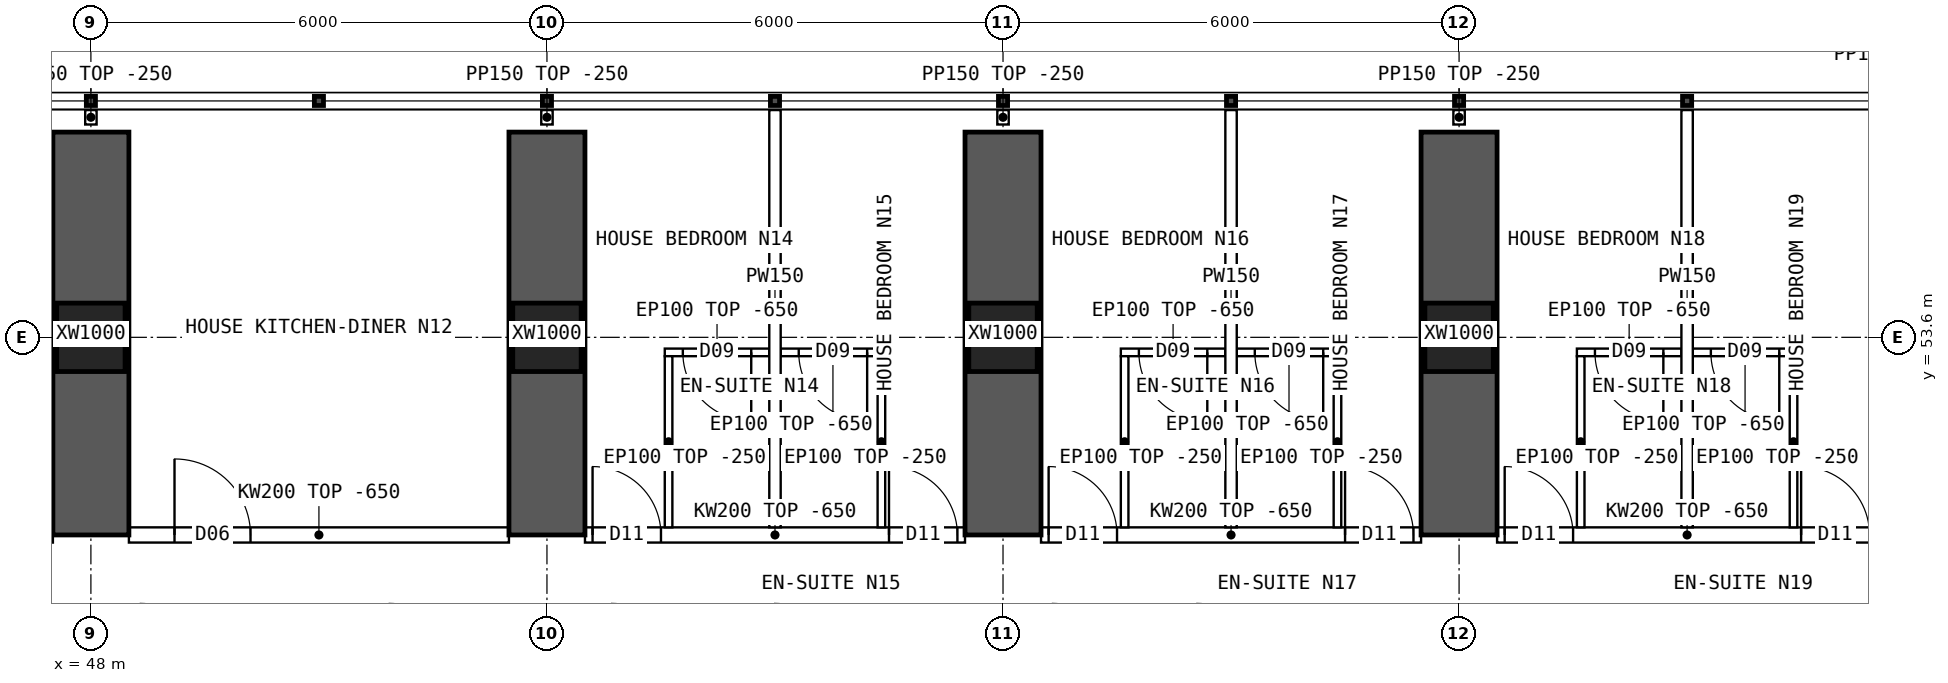
"""IFC4 building model, lengths in metres.
Left out: names, types, materials, properties, quantities, classifications, styles, units other than length and angle.
Written with IfcOpenShell. Run it as: python <this file> out.ifc"""

import sys

from ifc_helpers import new_model, si_unit, direction, frame, frame_2d, origin, origin_2d, place, context, subcontext, project, spatial, polyline, rectangle, hollow_rectangle, outline, extrude, element, fill, save


model = new_model("IFC4")
c1 = context("Model", 3, precision=1e-05, world=origin(), true_north=direction((0.0, 1.0)))
c2 = subcontext(c1, "Body", "Model", "MODEL_VIEW")
j1 = project(units=[si_unit("LENGTHUNIT", "METRE"), si_unit("PLANEANGLEUNIT", "RADIAN")], contexts=[c1])
p1 = place(None, origin())
s1 = spatial("IfcSite", under=j1, at=p1, CompositionType="ELEMENT")
p2 = place(p1, origin())
s2 = spatial("IfcBuilding", under=s1, at=p2, CompositionType="ELEMENT")
p3 = place(p2, frame((0.0, 0.0, 38.95)))
s3 = spatial("IfcBuildingStorey", under=s2, at=p3, CompositionType="ELEMENT", Elevation=38.95)
for number, where, z_axis, x_axis in (
    (1, (48.0, 53.6, 0.0), (0.0, 0.0, 1.0), (1.0, 0.0, 0.0)),
    (2, (54.0, 53.6, 0.0), (0.0, 0.0, 1.0), (1.0, 0.0, 0.0)),
    (3, (60.0, 53.6, 0.0), (0.0, 0.0, 1.0), (1.0, 0.0, 0.0)),
    (4, (66.0, 53.6, 0.0), (0.0, 0.0, 1.0), (1.0, 0.0, 0.0)),
):
    element("IfcColumn", number, at=place(p3, frame(where, z_axis=z_axis, x_axis=x_axis)), inside=s3, PredefinedType="COLUMN", context=c2, shape_type="SweptSolid", body=[
        extrude(hollow_rectangle(XDim=0.9, YDim=0.9, WallThickness=0.09, at=origin_2d()), origin(), (0.0, 0.0, 1.0), 3.75),
    ])
for number, where, z_axis, x_axis in (
    (5, (48.0, 51.0, 0.0), (0.0, 0.0, 1.0), (0.0, 1.0, 0.0)),
    (6, (54.0, 51.0, 0.0), (0.0, 0.0, 1.0), (0.0, 1.0, 0.0)),
    (7, (60.0, 51.0, 0.0), (0.0, 0.0, 1.0), (0.0, 1.0, 0.0)),
    (8, (66.0, 51.0, 0.0), (0.0, 0.0, 1.0), (0.0, 1.0, 0.0)),
):
    element("IfcWall", number, at=place(p3, frame(where, z_axis=z_axis, x_axis=x_axis)), inside=s3, PredefinedType="SHEAR", context=c2, shape_type="SweptSolid", body=[
        extrude(rectangle(XDim=5.3, YDim=1.0, at=frame_2d((2.65, 0.0))), origin(), (0.0, 0.0, 1.0), 3.75),
    ])
p4 = place(p3, frame((48.5, 51.0, 0.0), z_axis=(0.0, 0.0, 1.0), x_axis=(1.0, 0.0, 0.0)))
e9 = element("IfcWall", 9, at=p4, inside=s3, PredefinedType="SOLIDWALL", context=c2, shape_type="SweptSolid", body=[
    extrude(outline(polyline([(0.0, 0.0), (5.0, 0.0), (5.0, 3.1), (0.0, 3.1), (0.0, 0.0)])), frame((0.0, 0.1, 0.0), z_axis=(0.0, -1.0, 0.0), x_axis=(1.0, 0.0, 0.0)), (0.0, 0.0, 1.0), 0.2),
])
p5 = place(p4, frame((0.6, 0.0, 0.0)))
e10 = element("IfcOpeningElement", 10, at=p5, cuts=e9, PredefinedType="OPENING", context=c2, shape_type="SweptSolid", body=[
    extrude(rectangle(XDim=1.0, YDim=2.1, at=frame_2d((0.5, 1.05))), frame((0.0, 0.11, 0.0), z_axis=(0.0, -1.0, 0.0), x_axis=(1.0, 0.0, 0.0)), (0.0, 0.0, 1.0), 0.22),
])
p6 = place(p3, frame((54.5, 51.0, 0.0), z_axis=(0.0, 0.0, 1.0), x_axis=(1.0, 0.0, 0.0)))
e11 = element("IfcWall", 11, at=p6, inside=s3, PredefinedType="SOLIDWALL", context=c2, shape_type="SweptSolid", body=[
    extrude(outline(polyline([(0.0, 0.0), (5.0, 0.0), (5.0, 3.1), (0.0, 3.1), (0.0, 0.0)])), frame((0.0, 0.1, 0.0), z_axis=(0.0, -1.0, 0.0), x_axis=(1.0, 0.0, 0.0)), (0.0, 0.0, 1.0), 0.2),
])
p7 = place(p6, frame((0.1, 0.0, 0.0)))
e12 = element("IfcOpeningElement", 12, at=p7, cuts=e11, PredefinedType="OPENING", context=c2, shape_type="SweptSolid", body=[
    extrude(rectangle(XDim=0.9, YDim=2.1, at=frame_2d((0.45, 1.05))), frame((0.0, 0.11, 0.0), z_axis=(0.0, -1.0, 0.0), x_axis=(1.0, 0.0, 0.0)), (0.0, 0.0, 1.0), 0.22),
])
p8 = place(p6, frame((4.0, 0.0, 0.0)))
e13 = element("IfcOpeningElement", 13, at=p8, cuts=e11, PredefinedType="OPENING", context=c2, shape_type="SweptSolid", body=[
    extrude(rectangle(XDim=0.9, YDim=2.1, at=frame_2d((0.45, 1.05))), frame((0.0, 0.11, 0.0), z_axis=(0.0, -1.0, 0.0), x_axis=(1.0, 0.0, 0.0)), (0.0, 0.0, 1.0), 0.22),
])
p9 = place(p3, frame((60.5, 51.0, 0.0), z_axis=(0.0, 0.0, 1.0), x_axis=(1.0, 0.0, 0.0)))
e14 = element("IfcWall", 14, at=p9, inside=s3, PredefinedType="SOLIDWALL", context=c2, shape_type="SweptSolid", body=[
    extrude(outline(polyline([(0.0, 0.0), (5.0, 0.0), (5.0, 3.1), (0.0, 3.1), (0.0, 0.0)])), frame((0.0, 0.1, 0.0), z_axis=(0.0, -1.0, 0.0), x_axis=(1.0, 0.0, 0.0)), (0.0, 0.0, 1.0), 0.2),
])
p10 = place(p9, frame((0.1, 0.0, 0.0)))
e15 = element("IfcOpeningElement", 15, at=p10, cuts=e14, PredefinedType="OPENING", context=c2, shape_type="SweptSolid", body=[
    extrude(rectangle(XDim=0.9, YDim=2.1, at=frame_2d((0.45, 1.05))), frame((0.0, 0.11, 0.0), z_axis=(0.0, -1.0, 0.0), x_axis=(1.0, 0.0, 0.0)), (0.0, 0.0, 1.0), 0.22),
])
p11 = place(p9, frame((4.0, 0.0, 0.0)))
e16 = element("IfcOpeningElement", 16, at=p11, cuts=e14, PredefinedType="OPENING", context=c2, shape_type="SweptSolid", body=[
    extrude(rectangle(XDim=0.9, YDim=2.1, at=frame_2d((0.45, 1.05))), frame((0.0, 0.11, 0.0), z_axis=(0.0, -1.0, 0.0), x_axis=(1.0, 0.0, 0.0)), (0.0, 0.0, 1.0), 0.22),
])
p12 = place(p3, frame((66.5, 51.0, 0.0), z_axis=(0.0, 0.0, 1.0), x_axis=(1.0, 0.0, 0.0)))
e17 = element("IfcWall", 17, at=p12, inside=s3, PredefinedType="SOLIDWALL", context=c2, shape_type="SweptSolid", body=[
    extrude(outline(polyline([(0.0, 0.0), (5.0, 0.0), (5.0, 3.1), (0.0, 3.1), (0.0, 0.0)])), frame((0.0, 0.1, 0.0), z_axis=(0.0, -1.0, 0.0), x_axis=(1.0, 0.0, 0.0)), (0.0, 0.0, 1.0), 0.2),
])
p13 = place(p12, frame((0.1, 0.0, 0.0)))
e18 = element("IfcOpeningElement", 18, at=p13, cuts=e17, PredefinedType="OPENING", context=c2, shape_type="SweptSolid", body=[
    extrude(rectangle(XDim=0.9, YDim=2.1, at=frame_2d((0.45, 1.05))), frame((0.0, 0.11, 0.0), z_axis=(0.0, -1.0, 0.0), x_axis=(1.0, 0.0, 0.0)), (0.0, 0.0, 1.0), 0.22),
])
p14 = place(p12, frame((4.0, 0.0, 0.0)))
e19 = element("IfcOpeningElement", 19, at=p14, cuts=e17, PredefinedType="OPENING", context=c2, shape_type="SweptSolid", body=[
    extrude(rectangle(XDim=0.9, YDim=2.1, at=frame_2d((0.45, 1.05))), frame((0.0, 0.11, 0.0), z_axis=(0.0, -1.0, 0.0), x_axis=(1.0, 0.0, 0.0)), (0.0, 0.0, 1.0), 0.22),
])
p15 = place(p3, frame((57.0, 56.59, 0.0), z_axis=(0.0, 0.0, 1.0), x_axis=(0.0, -1.0, 0.0)))
e20 = element("IfcWall", 20, at=p15, inside=s3, PredefinedType="PARTITIONING", context=c2, shape_type="SweptSolid", body=[
    extrude(outline(polyline([(0.0, 0.0), (5.49, 0.0), (5.49, 3.1), (5.442, 3.1), (5.44, 3.5), (3.192, 3.5), (3.19, 3.1), (2.792, 3.1), (2.79, 3.5), (0.0, 3.5), (0.0, 0.0)])), frame((0.0, 0.075, 0.0), z_axis=(0.0, -1.0, 0.0), x_axis=(1.0, 0.0, 0.0)), (0.0, 0.0, 1.0), 0.15),
])
p16 = place(p3, frame((55.55, 53.402, 0.0), z_axis=(0.0, 0.0, 1.0), x_axis=(1.0, 0.0, 0.0)))
e21 = element("IfcWall", 21, at=p16, inside=s3, PredefinedType="PARTITIONING", context=c2, shape_type="SweptSolid", body=[
    extrude(outline(polyline([(0.0, 0.0), (1.375, 0.0), (1.375, 3.1), (0.0, 3.1), (0.0, 0.0)])), frame((0.0, 0.05, 0.0), z_axis=(0.0, -1.0, 0.0), x_axis=(1.0, 0.0, 0.0)), (0.0, 0.0, 1.0), 0.1),
])
p17 = place(p16, frame((0.238, 0.0, 0.0)))
e22 = element("IfcOpeningElement", 22, at=p17, cuts=e21, PredefinedType="OPENING", context=c2, shape_type="SweptSolid", body=[
    extrude(rectangle(XDim=0.9, YDim=2.1, at=frame_2d((0.45, 1.05))), frame((0.0, 0.06, 0.0), z_axis=(0.0, -1.0, 0.0), x_axis=(1.0, 0.0, 0.0)), (0.0, 0.0, 1.0), 0.12),
])
p18 = place(p3, frame((55.6, 53.352, 0.0), z_axis=(0.0, 0.0, 1.0), x_axis=(0.0, -1.0, 0.0)))
e23 = element("IfcWall", 23, at=p18, inside=s3, PredefinedType="PARTITIONING", context=c2, shape_type="SweptSolid", body=[
    extrude(outline(polyline([(0.0, 0.0), (2.252, 0.0), (2.252, 3.1), (2.204, 3.1), (2.202, 3.5), (0.0, 3.5), (0.0, 0.0)])), frame((0.0, 0.05, 0.0), z_axis=(0.0, -1.0, 0.0), x_axis=(1.0, 0.0, 0.0)), (0.0, 0.0, 1.0), 0.1),
])
p19 = place(p3, frame((57.075, 53.402, 0.0), z_axis=(0.0, 0.0, 1.0), x_axis=(1.0, 0.0, 0.0)))
e24 = element("IfcWall", 24, at=p19, inside=s3, PredefinedType="PARTITIONING", context=c2, shape_type="SweptSolid", body=[
    extrude(outline(polyline([(0.0, 0.0), (1.375, 0.0), (1.375, 3.1), (0.0, 3.1), (0.0, 0.0)])), frame((0.0, 0.05, 0.0), z_axis=(0.0, -1.0, 0.0), x_axis=(1.0, 0.0, 0.0)), (0.0, 0.0, 1.0), 0.1),
])
p20 = place(p19, frame((0.238, 0.0, 0.0)))
e25 = element("IfcOpeningElement", 25, at=p20, cuts=e24, PredefinedType="OPENING", context=c2, shape_type="SweptSolid", body=[
    extrude(rectangle(XDim=0.9, YDim=2.1, at=frame_2d((0.45, 1.05))), frame((0.0, 0.06, 0.0), z_axis=(0.0, -1.0, 0.0), x_axis=(1.0, 0.0, 0.0)), (0.0, 0.0, 1.0), 0.12),
])
p21 = place(p3, frame((58.4, 53.352, 0.0), z_axis=(0.0, 0.0, 1.0), x_axis=(0.0, -1.0, 0.0)))
e26 = element("IfcWall", 26, at=p21, inside=s3, PredefinedType="PARTITIONING", context=c2, shape_type="SweptSolid", body=[
    extrude(outline(polyline([(0.0, 0.0), (2.252, 0.0), (2.252, 3.1), (2.204, 3.1), (2.202, 3.5), (0.0, 3.5), (0.0, 0.0)])), frame((0.0, 0.05, 0.0), z_axis=(0.0, -1.0, 0.0), x_axis=(1.0, 0.0, 0.0)), (0.0, 0.0, 1.0), 0.1),
])
p22 = place(p3, frame((63.0, 56.59, 0.0), z_axis=(0.0, 0.0, 1.0), x_axis=(0.0, -1.0, 0.0)))
e27 = element("IfcWall", 27, at=p22, inside=s3, PredefinedType="PARTITIONING", context=c2, shape_type="SweptSolid", body=[
    extrude(outline(polyline([(0.0, 0.0), (5.49, 0.0), (5.49, 3.1), (5.442, 3.1), (5.44, 3.5), (3.192, 3.5), (3.19, 3.1), (2.792, 3.1), (2.79, 3.5), (0.0, 3.5), (0.0, 0.0)])), frame((0.0, 0.075, 0.0), z_axis=(0.0, -1.0, 0.0), x_axis=(1.0, 0.0, 0.0)), (0.0, 0.0, 1.0), 0.15),
])
p23 = place(p3, frame((61.55, 53.402, 0.0), z_axis=(0.0, 0.0, 1.0), x_axis=(1.0, 0.0, 0.0)))
e28 = element("IfcWall", 28, at=p23, inside=s3, PredefinedType="PARTITIONING", context=c2, shape_type="SweptSolid", body=[
    extrude(outline(polyline([(0.0, 0.0), (1.375, 0.0), (1.375, 3.1), (0.0, 3.1), (0.0, 0.0)])), frame((0.0, 0.05, 0.0), z_axis=(0.0, -1.0, 0.0), x_axis=(1.0, 0.0, 0.0)), (0.0, 0.0, 1.0), 0.1),
])
p24 = place(p23, frame((0.238, 0.0, 0.0)))
e29 = element("IfcOpeningElement", 29, at=p24, cuts=e28, PredefinedType="OPENING", context=c2, shape_type="SweptSolid", body=[
    extrude(rectangle(XDim=0.9, YDim=2.1, at=frame_2d((0.45, 1.05))), frame((0.0, 0.06, 0.0), z_axis=(0.0, -1.0, 0.0), x_axis=(1.0, 0.0, 0.0)), (0.0, 0.0, 1.0), 0.12),
])
p25 = place(p3, frame((61.6, 53.352, 0.0), z_axis=(0.0, 0.0, 1.0), x_axis=(0.0, -1.0, 0.0)))
e30 = element("IfcWall", 30, at=p25, inside=s3, PredefinedType="PARTITIONING", context=c2, shape_type="SweptSolid", body=[
    extrude(outline(polyline([(0.0, 0.0), (2.252, 0.0), (2.252, 3.1), (2.204, 3.1), (2.202, 3.5), (0.0, 3.5), (0.0, 0.0)])), frame((0.0, 0.05, 0.0), z_axis=(0.0, -1.0, 0.0), x_axis=(1.0, 0.0, 0.0)), (0.0, 0.0, 1.0), 0.1),
])
p26 = place(p3, frame((63.075, 53.402, 0.0), z_axis=(0.0, 0.0, 1.0), x_axis=(1.0, 0.0, 0.0)))
e31 = element("IfcWall", 31, at=p26, inside=s3, PredefinedType="PARTITIONING", context=c2, shape_type="SweptSolid", body=[
    extrude(outline(polyline([(0.0, 0.0), (1.375, 0.0), (1.375, 3.1), (0.0, 3.1), (0.0, 0.0)])), frame((0.0, 0.05, 0.0), z_axis=(0.0, -1.0, 0.0), x_axis=(1.0, 0.0, 0.0)), (0.0, 0.0, 1.0), 0.1),
])
p27 = place(p26, frame((0.238, 0.0, 0.0)))
e32 = element("IfcOpeningElement", 32, at=p27, cuts=e31, PredefinedType="OPENING", context=c2, shape_type="SweptSolid", body=[
    extrude(rectangle(XDim=0.9, YDim=2.1, at=frame_2d((0.45, 1.05))), frame((0.0, 0.06, 0.0), z_axis=(0.0, -1.0, 0.0), x_axis=(1.0, 0.0, 0.0)), (0.0, 0.0, 1.0), 0.12),
])
p28 = place(p3, frame((64.4, 53.352, 0.0), z_axis=(0.0, 0.0, 1.0), x_axis=(0.0, -1.0, 0.0)))
e33 = element("IfcWall", 33, at=p28, inside=s3, PredefinedType="PARTITIONING", context=c2, shape_type="SweptSolid", body=[
    extrude(outline(polyline([(0.0, 0.0), (2.252, 0.0), (2.252, 3.1), (2.204, 3.1), (2.202, 3.5), (0.0, 3.5), (0.0, 0.0)])), frame((0.0, 0.05, 0.0), z_axis=(0.0, -1.0, 0.0), x_axis=(1.0, 0.0, 0.0)), (0.0, 0.0, 1.0), 0.1),
])
p29 = place(p3, frame((69.0, 56.59, 0.0), z_axis=(0.0, 0.0, 1.0), x_axis=(0.0, -1.0, 0.0)))
e34 = element("IfcWall", 34, at=p29, inside=s3, PredefinedType="PARTITIONING", context=c2, shape_type="SweptSolid", body=[
    extrude(outline(polyline([(0.0, 0.0), (5.49, 0.0), (5.49, 3.1), (5.442, 3.1), (5.44, 3.5), (3.192, 3.5), (3.19, 3.1), (2.792, 3.1), (2.79, 3.5), (0.0, 3.5), (0.0, 0.0)])), frame((0.0, 0.075, 0.0), z_axis=(0.0, -1.0, 0.0), x_axis=(1.0, 0.0, 0.0)), (0.0, 0.0, 1.0), 0.15),
])
p30 = place(p3, frame((67.55, 53.402, 0.0), z_axis=(0.0, 0.0, 1.0), x_axis=(1.0, 0.0, 0.0)))
e35 = element("IfcWall", 35, at=p30, inside=s3, PredefinedType="PARTITIONING", context=c2, shape_type="SweptSolid", body=[
    extrude(outline(polyline([(0.0, 0.0), (1.375, 0.0), (1.375, 3.1), (0.0, 3.1), (0.0, 0.0)])), frame((0.0, 0.05, 0.0), z_axis=(0.0, -1.0, 0.0), x_axis=(1.0, 0.0, 0.0)), (0.0, 0.0, 1.0), 0.1),
])
p31 = place(p30, frame((0.238, 0.0, 0.0)))
e36 = element("IfcOpeningElement", 36, at=p31, cuts=e35, PredefinedType="OPENING", context=c2, shape_type="SweptSolid", body=[
    extrude(rectangle(XDim=0.9, YDim=2.1, at=frame_2d((0.45, 1.05))), frame((0.0, 0.06, 0.0), z_axis=(0.0, -1.0, 0.0), x_axis=(1.0, 0.0, 0.0)), (0.0, 0.0, 1.0), 0.12),
])
p32 = place(p3, frame((67.6, 53.352, 0.0), z_axis=(0.0, 0.0, 1.0), x_axis=(0.0, -1.0, 0.0)))
e37 = element("IfcWall", 37, at=p32, inside=s3, PredefinedType="PARTITIONING", context=c2, shape_type="SweptSolid", body=[
    extrude(outline(polyline([(0.0, 0.0), (2.252, 0.0), (2.252, 3.1), (2.204, 3.1), (2.202, 3.5), (0.0, 3.5), (0.0, 0.0)])), frame((0.0, 0.05, 0.0), z_axis=(0.0, -1.0, 0.0), x_axis=(1.0, 0.0, 0.0)), (0.0, 0.0, 1.0), 0.1),
])
p33 = place(p3, frame((69.075, 53.402, 0.0), z_axis=(0.0, 0.0, 1.0), x_axis=(1.0, 0.0, 0.0)))
e38 = element("IfcWall", 38, at=p33, inside=s3, PredefinedType="PARTITIONING", context=c2, shape_type="SweptSolid", body=[
    extrude(outline(polyline([(0.0, 0.0), (1.375, 0.0), (1.375, 3.1), (0.0, 3.1), (0.0, 0.0)])), frame((0.0, 0.05, 0.0), z_axis=(0.0, -1.0, 0.0), x_axis=(1.0, 0.0, 0.0)), (0.0, 0.0, 1.0), 0.1),
])
p34 = place(p33, frame((0.238, 0.0, 0.0)))
e39 = element("IfcOpeningElement", 39, at=p34, cuts=e38, PredefinedType="OPENING", context=c2, shape_type="SweptSolid", body=[
    extrude(rectangle(XDim=0.9, YDim=2.1, at=frame_2d((0.45, 1.05))), frame((0.0, 0.06, 0.0), z_axis=(0.0, -1.0, 0.0), x_axis=(1.0, 0.0, 0.0)), (0.0, 0.0, 1.0), 0.12),
])
p35 = place(p3, frame((70.4, 53.352, 0.0), z_axis=(0.0, 0.0, 1.0), x_axis=(0.0, -1.0, 0.0)))
e40 = element("IfcWall", 40, at=p35, inside=s3, PredefinedType="PARTITIONING", context=c2, shape_type="SweptSolid", body=[
    extrude(outline(polyline([(0.0, 0.0), (2.252, 0.0), (2.252, 3.1), (2.204, 3.1), (2.202, 3.5), (0.0, 3.5), (0.0, 0.0)])), frame((0.0, 0.05, 0.0), z_axis=(0.0, -1.0, 0.0), x_axis=(1.0, 0.0, 0.0)), (0.0, 0.0, 1.0), 0.1),
])
for number, where, z_axis, x_axis in (
    (41, (48.0, 56.4, 0.0), (0.0, 0.0, 1.0), (0.0, 1.0, 0.0)),
    (42, (54.0, 56.4, 0.0), (0.0, 0.0, 1.0), (0.0, 1.0, 0.0)),
    (43, (60.0, 56.4, 0.0), (0.0, 0.0, 1.0), (0.0, 1.0, 0.0)),
    (44, (66.0, 56.4, 0.0), (0.0, 0.0, 1.0), (0.0, 1.0, 0.0)),
):
    element("IfcWall", number, at=place(p3, frame(where, z_axis=z_axis, x_axis=x_axis)), inside=s3, PredefinedType="PARTITIONING", context=c2, shape_type="SweptSolid", body=[
        extrude(rectangle(XDim=0.19, YDim=0.15, at=frame_2d((0.095, 0.0))), origin(), (0.0, 0.0, 1.0), 3.5),
    ])
p36 = place(p5, origin())
e45 = element("IfcDoor", 45, at=p36, inside=s3, OperationType="SINGLE_SWING_LEFT", PredefinedType="DOOR", context=c2, shape_type="SweptSolid", body=[
    extrude(rectangle(XDim=1.0, YDim=2.1, at=frame_2d((0.5, 1.05))), frame((0.0, 0.025, 0.0), z_axis=(0.0, -1.0, 0.0), x_axis=(1.0, 0.0, 0.0)), (0.0, 0.0, 1.0), 0.05),
])
fill(e10, e45)
p37 = place(p17, origin())
e46 = element("IfcDoor", 46, at=p37, inside=s3, OperationType="SINGLE_SWING_RIGHT", PredefinedType="DOOR", context=c2, shape_type="SweptSolid", body=[
    extrude(rectangle(XDim=0.9, YDim=2.1, at=frame_2d((0.45, 1.05))), frame((0.0, 0.025, 0.0), z_axis=(0.0, -1.0, 0.0), x_axis=(1.0, 0.0, 0.0)), (0.0, 0.0, 1.0), 0.05),
])
fill(e22, e46)
p38 = place(p7, origin())
e47 = element("IfcDoor", 47, at=p38, inside=s3, OperationType="SINGLE_SWING_LEFT", PredefinedType="DOOR", context=c2, shape_type="SweptSolid", body=[
    extrude(rectangle(XDim=0.9, YDim=2.1, at=frame_2d((0.45, 1.05))), frame((0.0, 0.025, 0.0), z_axis=(0.0, -1.0, 0.0), x_axis=(1.0, 0.0, 0.0)), (0.0, 0.0, 1.0), 0.05),
])
fill(e12, e47)
p39 = place(p20, origin())
e48 = element("IfcDoor", 48, at=p39, inside=s3, OperationType="SINGLE_SWING_RIGHT", PredefinedType="DOOR", context=c2, shape_type="SweptSolid", body=[
    extrude(rectangle(XDim=0.9, YDim=2.1, at=frame_2d((0.45, 1.05))), frame((0.0, 0.025, 0.0), z_axis=(0.0, -1.0, 0.0), x_axis=(1.0, 0.0, 0.0)), (0.0, 0.0, 1.0), 0.05),
])
fill(e25, e48)
p40 = place(p8, origin())
e49 = element("IfcDoor", 49, at=p40, inside=s3, OperationType="SINGLE_SWING_LEFT", PredefinedType="DOOR", context=c2, shape_type="SweptSolid", body=[
    extrude(rectangle(XDim=0.9, YDim=2.1, at=frame_2d((0.45, 1.05))), frame((0.0, 0.025, 0.0), z_axis=(0.0, -1.0, 0.0), x_axis=(1.0, 0.0, 0.0)), (0.0, 0.0, 1.0), 0.05),
])
fill(e13, e49)
p41 = place(p24, origin())
e50 = element("IfcDoor", 50, at=p41, inside=s3, OperationType="SINGLE_SWING_RIGHT", PredefinedType="DOOR", context=c2, shape_type="SweptSolid", body=[
    extrude(rectangle(XDim=0.9, YDim=2.1, at=frame_2d((0.45, 1.05))), frame((0.0, 0.025, 0.0), z_axis=(0.0, -1.0, 0.0), x_axis=(1.0, 0.0, 0.0)), (0.0, 0.0, 1.0), 0.05),
])
fill(e29, e50)
p42 = place(p10, origin())
e51 = element("IfcDoor", 51, at=p42, inside=s3, OperationType="SINGLE_SWING_LEFT", PredefinedType="DOOR", context=c2, shape_type="SweptSolid", body=[
    extrude(rectangle(XDim=0.9, YDim=2.1, at=frame_2d((0.45, 1.05))), frame((0.0, 0.025, 0.0), z_axis=(0.0, -1.0, 0.0), x_axis=(1.0, 0.0, 0.0)), (0.0, 0.0, 1.0), 0.05),
])
fill(e15, e51)
p43 = place(p27, origin())
e52 = element("IfcDoor", 52, at=p43, inside=s3, OperationType="SINGLE_SWING_RIGHT", PredefinedType="DOOR", context=c2, shape_type="SweptSolid", body=[
    extrude(rectangle(XDim=0.9, YDim=2.1, at=frame_2d((0.45, 1.05))), frame((0.0, 0.025, 0.0), z_axis=(0.0, -1.0, 0.0), x_axis=(1.0, 0.0, 0.0)), (0.0, 0.0, 1.0), 0.05),
])
fill(e32, e52)
p44 = place(p11, origin())
e53 = element("IfcDoor", 53, at=p44, inside=s3, OperationType="SINGLE_SWING_LEFT", PredefinedType="DOOR", context=c2, shape_type="SweptSolid", body=[
    extrude(rectangle(XDim=0.9, YDim=2.1, at=frame_2d((0.45, 1.05))), frame((0.0, 0.025, 0.0), z_axis=(0.0, -1.0, 0.0), x_axis=(1.0, 0.0, 0.0)), (0.0, 0.0, 1.0), 0.05),
])
fill(e16, e53)
p45 = place(p31, origin())
e54 = element("IfcDoor", 54, at=p45, inside=s3, OperationType="SINGLE_SWING_RIGHT", PredefinedType="DOOR", context=c2, shape_type="SweptSolid", body=[
    extrude(rectangle(XDim=0.9, YDim=2.1, at=frame_2d((0.45, 1.05))), frame((0.0, 0.025, 0.0), z_axis=(0.0, -1.0, 0.0), x_axis=(1.0, 0.0, 0.0)), (0.0, 0.0, 1.0), 0.05),
])
fill(e36, e54)
p46 = place(p13, origin())
e55 = element("IfcDoor", 55, at=p46, inside=s3, OperationType="SINGLE_SWING_LEFT", PredefinedType="DOOR", context=c2, shape_type="SweptSolid", body=[
    extrude(rectangle(XDim=0.9, YDim=2.1, at=frame_2d((0.45, 1.05))), frame((0.0, 0.025, 0.0), z_axis=(0.0, -1.0, 0.0), x_axis=(1.0, 0.0, 0.0)), (0.0, 0.0, 1.0), 0.05),
])
fill(e18, e55)
p47 = place(p34, origin())
e56 = element("IfcDoor", 56, at=p47, inside=s3, OperationType="SINGLE_SWING_RIGHT", PredefinedType="DOOR", context=c2, shape_type="SweptSolid", body=[
    extrude(rectangle(XDim=0.9, YDim=2.1, at=frame_2d((0.45, 1.05))), frame((0.0, 0.025, 0.0), z_axis=(0.0, -1.0, 0.0), x_axis=(1.0, 0.0, 0.0)), (0.0, 0.0, 1.0), 0.05),
])
fill(e39, e56)
p48 = place(p14, origin())
e57 = element("IfcDoor", 57, at=p48, inside=s3, OperationType="SINGLE_SWING_LEFT", PredefinedType="DOOR", context=c2, shape_type="SweptSolid", body=[
    extrude(rectangle(XDim=0.9, YDim=2.1, at=frame_2d((0.45, 1.05))), frame((0.0, 0.025, 0.0), z_axis=(0.0, -1.0, 0.0), x_axis=(1.0, 0.0, 0.0)), (0.0, 0.0, 1.0), 0.05),
])
fill(e19, e57)
save(model, sys.argv[1])
